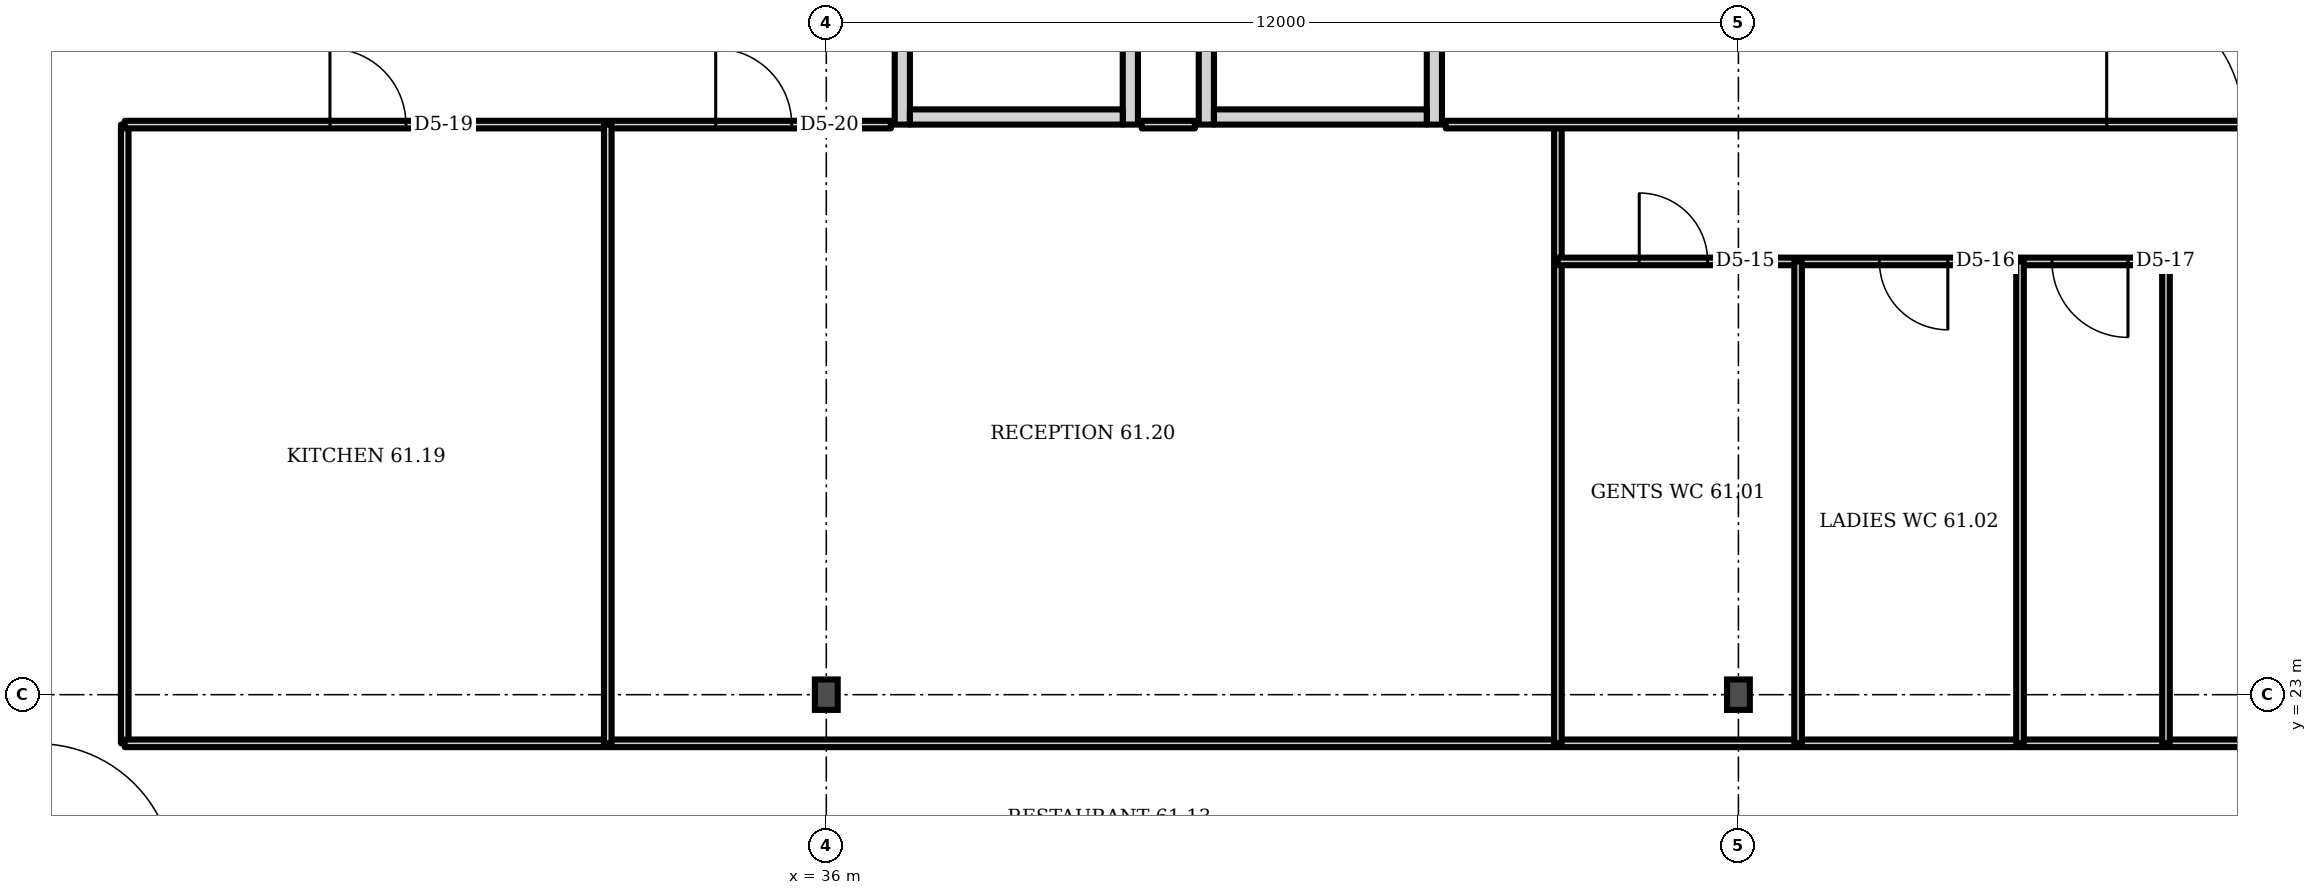
"""IFC4 building model, lengths in metres.
Left out: names, types, materials, properties, quantities, classifications, styles, units other than length and angle.
Written with IfcOpenShell. Run it as: python <this file> out.ifc"""

import sys

from ifc_helpers import new_model, si_unit, direction, frame, frame_2d, origin, origin_2d, place, context, subcontext, project, spatial, rectangle, i_section, extrude, element, fill, save


model = new_model("IFC4")
c1 = context("Model", 3, precision=1e-05, world=origin(), true_north=direction((0.0, 1.0)))
c2 = subcontext(c1, "Body", "Model", "MODEL_VIEW")
j1 = project(units=[si_unit("LENGTHUNIT", "METRE"), si_unit("PLANEANGLEUNIT", "RADIAN")], contexts=[c1])
p1 = place(None, origin())
s1 = spatial("IfcSite", under=j1, at=p1, CompositionType="ELEMENT")
p2 = place(p1, origin())
s2 = spatial("IfcBuilding", under=s1, at=p2, CompositionType="ELEMENT")
p3 = place(p2, frame((0.0, 0.0, 243.1)))
s3 = spatial("IfcBuildingStorey", under=s2, at=p3, CompositionType="ELEMENT", Elevation=243.1)
for number, where, z_axis, x_axis in (
    (1, (36.0, 23.0, 0.0), (0.0, 0.0, 1.0), (1.0, 0.0, 0.0)),
    (2, (48.0, 23.0, 0.0), (0.0, 0.0, 1.0), (1.0, 0.0, 0.0)),
):
    element("IfcColumn", number, at=place(p3, frame(where, z_axis=z_axis, x_axis=x_axis)), inside=s3, PredefinedType="COLUMN", context=c2, shape_type="SweptSolid", body=[
        extrude(i_section(OverallWidth=0.3, OverallDepth=0.4, WebThickness=0.013, FlangeThickness=0.024, FilletRadius=0.027, at=origin_2d()), origin(), (0.0, 0.0, 1.0), 3.6),
    ])
p4 = place(p3, frame((37.0, 30.5, 0.0), z_axis=(0.0, 0.0, 1.0), x_axis=(0.0, 1.0, 0.0)))
e3 = element("IfcWall", 3, at=p4, inside=s3, PredefinedType="PARTITIONING", context=c2, shape_type="SweptSolid", body=[
    extrude(rectangle(XDim=3.5, YDim=0.2, at=frame_2d((1.75, 0.0))), origin(), (0.0, 0.0, 1.0), 3.2),
])
p5 = place(p4, frame((1.2, 0.0, 0.0)))
e4 = element("IfcOpeningElement", 4, at=p5, cuts=e3, PredefinedType="OPENING", context=c2, shape_type="SweptSolid", body=[
    extrude(rectangle(XDim=1.1, YDim=2.1, at=frame_2d((0.55, 1.05))), frame((0.0, 0.11, 0.0), z_axis=(0.0, -1.0, 0.0), x_axis=(1.0, 0.0, 0.0)), (0.0, 0.0, 1.0), 0.22),
])
p6 = place(p3, frame((40.0, 30.5, 0.0), z_axis=(0.0, 0.0, 1.0), x_axis=(0.0, 1.0, 0.0)))
e5 = element("IfcWall", 5, at=p6, inside=s3, PredefinedType="PARTITIONING", context=c2, shape_type="SweptSolid", body=[
    extrude(rectangle(XDim=3.5, YDim=0.2, at=frame_2d((1.75, 0.0))), origin(), (0.0, 0.0, 1.0), 3.2),
])
p7 = place(p3, frame((37.1, 30.6, 0.0), z_axis=(0.0, 0.0, 1.0), x_axis=(1.0, 0.0, 0.0)))
e6 = element("IfcWall", 6, at=p7, inside=s3, PredefinedType="PARTITIONING", context=c2, shape_type="SweptSolid", body=[
    extrude(rectangle(XDim=2.8, YDim=0.2, at=frame_2d((1.4, 0.0))), origin(), (0.0, 0.0, 1.0), 3.2),
])
p8 = place(p3, frame((41.0, 30.5, 0.0), z_axis=(0.0, 0.0, 1.0), x_axis=(0.0, 1.0, 0.0)))
e7 = element("IfcWall", 7, at=p8, inside=s3, PredefinedType="PARTITIONING", context=c2, shape_type="SweptSolid", body=[
    extrude(rectangle(XDim=3.5, YDim=0.2, at=frame_2d((1.75, 0.0))), origin(), (0.0, 0.0, 1.0), 3.2),
])
p9 = place(p3, frame((44.0, 30.5, 0.0), z_axis=(0.0, 0.0, 1.0), x_axis=(0.0, 1.0, 0.0)))
e8 = element("IfcWall", 8, at=p9, inside=s3, PredefinedType="PARTITIONING", context=c2, shape_type="SweptSolid", body=[
    extrude(rectangle(XDim=3.5, YDim=0.2, at=frame_2d((1.75, 0.0))), origin(), (0.0, 0.0, 1.0), 3.2),
])
p10 = place(p9, frame((1.2, 0.0, 0.0)))
e9 = element("IfcOpeningElement", 9, at=p10, cuts=e8, PredefinedType="OPENING", context=c2, shape_type="SweptSolid", body=[
    extrude(rectangle(XDim=1.1, YDim=2.1, at=frame_2d((0.55, 1.05))), frame((0.0, 0.11, 0.0), z_axis=(0.0, -1.0, 0.0), x_axis=(1.0, 0.0, 0.0)), (0.0, 0.0, 1.0), 0.22),
])
p11 = place(p3, frame((41.1, 30.6, 0.0), z_axis=(0.0, 0.0, 1.0), x_axis=(1.0, 0.0, 0.0)))
e10 = element("IfcWall", 10, at=p11, inside=s3, PredefinedType="PARTITIONING", context=c2, shape_type="SweptSolid", body=[
    extrude(rectangle(XDim=2.8, YDim=0.2, at=frame_2d((1.4, 0.0))), origin(), (0.0, 0.0, 1.0), 3.2),
])
p12 = place(p3, frame((26.77, 22.36, 0.0), z_axis=(0.0, 0.0, 1.0), x_axis=(0.0, 1.0, 0.0)))
e11 = element("IfcWall", 11, at=p12, inside=s3, PredefinedType="PARTITIONING", context=c2, shape_type="SweptSolid", body=[
    extrude(rectangle(XDim=8.14, YDim=0.1, at=frame_2d((4.07, 0.0))), origin(), (0.0, 0.0, 1.0), 3.2),
])
p13 = place(p3, frame((26.77, 22.36, 0.0), z_axis=(0.0, 0.0, 1.0), x_axis=(1.0, 0.0, 0.0)))
e12 = element("IfcWall", 12, at=p13, inside=s3, PredefinedType="PARTITIONING", context=c2, shape_type="SweptSolid", body=[
    extrude(rectangle(XDim=38.3, YDim=0.1, at=frame_2d((19.15, 0.0))), origin(), (0.0, 0.0, 1.0), 3.2),
])
p14 = place(p3, frame((26.77, 30.5, 0.0), z_axis=(0.0, 0.0, 1.0), x_axis=(1.0, 0.0, 0.0)))
e13 = element("IfcWall", 13, at=p14, inside=s3, PredefinedType="PARTITIONING", context=c2, shape_type="SweptSolid", body=[
    extrude(rectangle(XDim=10.08, YDim=0.1, at=frame_2d((5.04, 0.0))), origin(), (0.0, 0.0, 1.0), 3.2),
])
p15 = place(p14, frame((2.7, 0.0, 0.0)))
e14 = element("IfcOpeningElement", 14, at=p15, cuts=e13, PredefinedType="OPENING", context=c2, shape_type="SweptSolid", body=[
    extrude(rectangle(XDim=1.0, YDim=2.1, at=frame_2d((0.5, 1.05))), frame((0.0, 0.06, 0.0), z_axis=(0.0, -1.0, 0.0), x_axis=(1.0, 0.0, 0.0)), (0.0, 0.0, 1.0), 0.12),
])
p16 = place(p14, frame((7.775, 0.0, 0.0)))
e15 = element("IfcOpeningElement", 15, at=p16, cuts=e13, PredefinedType="OPENING", context=c2, shape_type="SweptSolid", body=[
    extrude(rectangle(XDim=1.0, YDim=2.1, at=frame_2d((0.5, 1.05))), frame((0.0, 0.06, 0.0), z_axis=(0.0, -1.0, 0.0), x_axis=(1.0, 0.0, 0.0)), (0.0, 0.0, 1.0), 0.12),
])
p17 = place(p3, frame((33.125, 22.36, 0.0), z_axis=(0.0, 0.0, 1.0), x_axis=(0.0, 1.0, 0.0)))
e16 = element("IfcWall", 16, at=p17, inside=s3, PredefinedType="PARTITIONING", context=c2, shape_type="SweptSolid", body=[
    extrude(rectangle(XDim=8.14, YDim=0.1, at=frame_2d((4.07, 0.0))), origin(), (0.0, 0.0, 1.0), 3.2),
])
p18 = place(p3, frame((45.625, 22.36, 0.0), z_axis=(0.0, 0.0, 1.0), x_axis=(0.0, 1.0, 0.0)))
e17 = element("IfcWall", 17, at=p18, inside=s3, PredefinedType="PARTITIONING", context=c2, shape_type="SweptSolid", body=[
    extrude(rectangle(XDim=8.13, YDim=0.1, at=frame_2d((4.065, 0.0))), origin(), (0.0, 0.0, 1.0), 3.2),
])
p19 = place(p3, frame((45.625, 28.7, 0.0), z_axis=(0.0, 0.0, 1.0), x_axis=(1.0, 0.0, 0.0)))
e18 = element("IfcWall", 18, at=p19, inside=s3, PredefinedType="PARTITIONING", context=c2, shape_type="SweptSolid", body=[
    extrude(rectangle(XDim=8.0, YDim=0.1, at=frame_2d((4.0, 0.0))), origin(), (0.0, 0.0, 1.0), 3.2),
])
p20 = place(p19, frame((1.07, 0.0, 0.0)))
e19 = element("IfcOpeningElement", 19, at=p20, cuts=e18, PredefinedType="OPENING", context=c2, shape_type="SweptSolid", body=[
    extrude(rectangle(XDim=0.9, YDim=2.1, at=frame_2d((0.45, 1.05))), frame((0.0, 0.06, 0.0), z_axis=(0.0, -1.0, 0.0), x_axis=(1.0, 0.0, 0.0)), (0.0, 0.0, 1.0), 0.12),
])
p21 = place(p19, frame((4.23, 0.0, 0.0)))
e20 = element("IfcOpeningElement", 20, at=p21, cuts=e18, PredefinedType="OPENING", context=c2, shape_type="SweptSolid", body=[
    extrude(rectangle(XDim=0.9, YDim=2.1, at=frame_2d((0.45, 1.05))), frame((0.0, 0.06, 0.0), z_axis=(0.0, -1.0, 0.0), x_axis=(1.0, 0.0, 0.0)), (0.0, 0.0, 1.0), 0.12),
])
p22 = place(p19, frame((6.5, 0.0, 0.0)))
e21 = element("IfcOpeningElement", 21, at=p22, cuts=e18, PredefinedType="OPENING", context=c2, shape_type="SweptSolid", body=[
    extrude(rectangle(XDim=1.0, YDim=2.1, at=frame_2d((0.5, 1.05))), frame((0.0, 0.06, 0.0), z_axis=(0.0, -1.0, 0.0), x_axis=(1.0, 0.0, 0.0)), (0.0, 0.0, 1.0), 0.12),
])
for number, where, z_axis, x_axis in (
    (22, (48.785, 22.36, 0.0), (0.0, 0.0, 1.0), (0.0, 1.0, 0.0)),
    (23, (51.705, 22.36, 0.0), (0.0, 0.0, 1.0), (0.0, 1.0, 0.0)),
    (24, (53.625, 22.36, 0.0), (0.0, 0.0, 1.0), (0.0, 1.0, 0.0)),
):
    element("IfcWall", number, at=place(p3, frame(where, z_axis=z_axis, x_axis=x_axis)), inside=s3, PredefinedType="PARTITIONING", context=c2, shape_type="SweptSolid", body=[
        extrude(rectangle(XDim=6.34, YDim=0.1, at=frame_2d((3.17, 0.0))), origin(), (0.0, 0.0, 1.0), 3.2),
    ])
p23 = place(p3, frame((40.15, 30.5, 0.0), z_axis=(0.0, 0.0, 1.0), x_axis=(1.0, 0.0, 0.0)))
e25 = element("IfcWall", 25, at=p23, inside=s3, PredefinedType="PARTITIONING", context=c2, shape_type="SweptSolid", body=[
    extrude(rectangle(XDim=0.7, YDim=0.1, at=frame_2d((0.35, 0.0))), origin(), (0.0, 0.0, 1.0), 3.2),
])
p24 = place(p3, frame((44.15, 30.5, 0.0), z_axis=(0.0, 0.0, 1.0), x_axis=(1.0, 0.0, 0.0)))
e26 = element("IfcWall", 26, at=p24, inside=s3, PredefinedType="PARTITIONING", context=c2, shape_type="SweptSolid", body=[
    extrude(rectangle(XDim=13.85, YDim=0.1, at=frame_2d((6.925, 0.0))), origin(), (0.0, 0.0, 1.0), 3.2),
])
p25 = place(p24, frame((8.695, 0.0, 0.0)))
e27 = element("IfcOpeningElement", 27, at=p25, cuts=e26, PredefinedType="OPENING", context=c2, shape_type="SweptSolid", body=[
    extrude(rectangle(XDim=1.8, YDim=2.1, at=frame_2d((0.9, 1.05))), frame((0.0, 0.06, 0.0), z_axis=(0.0, -1.0, 0.0), x_axis=(1.0, 0.0, 0.0)), (0.0, 0.0, 1.0), 0.12),
])
p26 = place(p20, origin())
e28 = element("IfcDoor", 28, at=p26, inside=s3, OperationType="SINGLE_SWING_LEFT", PredefinedType="DOOR", context=c2, shape_type="SweptSolid", body=[
    extrude(rectangle(XDim=0.9, YDim=2.1, at=frame_2d((0.45, 1.05))), frame((0.0, 0.025, 0.0), z_axis=(0.0, -1.0, 0.0), x_axis=(1.0, 0.0, 0.0)), (0.0, 0.0, 1.0), 0.05),
])
fill(e19, e28)
p27 = place(p21, origin())
e29 = element("IfcDoor", 29, at=p27, inside=s3, OperationType="SINGLE_SWING_RIGHT", PredefinedType="DOOR", context=c2, shape_type="SweptSolid", body=[
    extrude(rectangle(XDim=0.9, YDim=2.1, at=frame_2d((0.45, 1.05))), frame((0.0, 0.025, 0.0), z_axis=(0.0, -1.0, 0.0), x_axis=(1.0, 0.0, 0.0)), (0.0, 0.0, 1.0), 0.05),
])
fill(e20, e29)
p28 = place(p22, origin())
e30 = element("IfcDoor", 30, at=p28, inside=s3, OperationType="SINGLE_SWING_RIGHT", PredefinedType="DOOR", context=c2, shape_type="SweptSolid", body=[
    extrude(rectangle(XDim=1.0, YDim=2.1, at=frame_2d((0.5, 1.05))), frame((0.0, 0.025, 0.0), z_axis=(0.0, -1.0, 0.0), x_axis=(1.0, 0.0, 0.0)), (0.0, 0.0, 1.0), 0.05),
])
fill(e21, e30)
p29 = place(p15, origin())
e31 = element("IfcDoor", 31, at=p29, inside=s3, OperationType="SINGLE_SWING_LEFT", PredefinedType="DOOR", context=c2, shape_type="SweptSolid", body=[
    extrude(rectangle(XDim=1.0, YDim=2.1, at=frame_2d((0.5, 1.05))), frame((0.0, 0.025, 0.0), z_axis=(0.0, -1.0, 0.0), x_axis=(1.0, 0.0, 0.0)), (0.0, 0.0, 1.0), 0.05),
])
fill(e14, e31)
p30 = place(p16, origin())
e32 = element("IfcDoor", 32, at=p30, inside=s3, OperationType="SINGLE_SWING_LEFT", PredefinedType="DOOR", context=c2, shape_type="SweptSolid", body=[
    extrude(rectangle(XDim=1.0, YDim=2.1, at=frame_2d((0.5, 1.05))), frame((0.0, 0.025, 0.0), z_axis=(0.0, -1.0, 0.0), x_axis=(1.0, 0.0, 0.0)), (0.0, 0.0, 1.0), 0.05),
])
fill(e15, e32)
p31 = place(p25, origin())
e33 = element("IfcDoor", 33, at=p31, inside=s3, OperationType="DOUBLE_DOOR_SINGLE_SWING", PredefinedType="DOOR", context=c2, shape_type="SweptSolid", body=[
    extrude(rectangle(XDim=1.8, YDim=2.1, at=frame_2d((0.9, 1.05))), frame((0.0, 0.025, 0.0), z_axis=(0.0, -1.0, 0.0), x_axis=(1.0, 0.0, 0.0)), (0.0, 0.0, 1.0), 0.05),
])
fill(e27, e33)
save(model, sys.argv[1])
